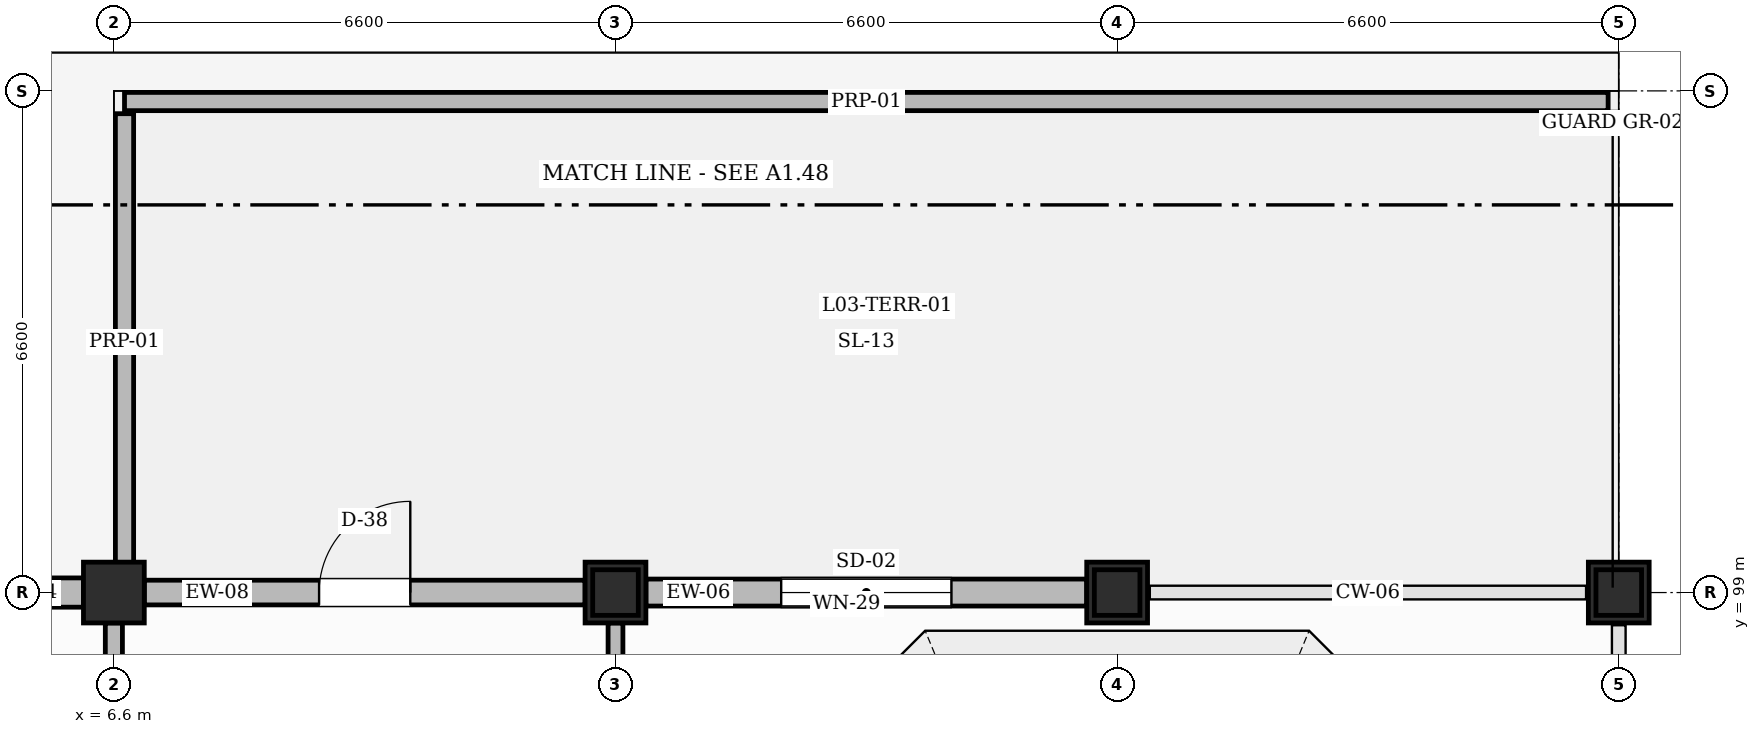
"""IFC4 building model, lengths in metres.
Left out: names, types, materials, properties, quantities, classifications, styles, units other than length and angle.
Written with IfcOpenShell. Run it as: python <this file> out.ifc"""

import sys

from ifc_helpers import new_model, si_unit, direction, frame, frame_2d, origin, origin_2d, place, context, subcontext, project, spatial, rectangle, extrude, element, fill, save


model = new_model("IFC4")
c1 = context("Model", 3, precision=1e-05, world=origin(), true_north=direction((0.0, 1.0)))
c2 = subcontext(c1, "Body", "Model", "MODEL_VIEW")
j1 = project(units=[si_unit("LENGTHUNIT", "METRE"), si_unit("PLANEANGLEUNIT", "RADIAN")], contexts=[c1])
p1 = place(None, origin())
s1 = spatial("IfcSite", under=j1, at=p1, CompositionType="ELEMENT")
p2 = place(p1, origin())
s2 = spatial("IfcBuilding", under=s1, at=p2, CompositionType="ELEMENT")
p3 = place(p2, frame((0.0, 0.0, 14.4)))
s3 = spatial("IfcBuildingStorey", under=s2, at=p3, CompositionType="ELEMENT", Elevation=14.4)
for number, where, z_axis, x_axis in (
    (1, (6.6, 99.0, 0.0), (0.0, 0.0, 1.0), (1.0, 0.0, 0.0)),
    (2, (13.2, 99.0, 0.0), (0.0, 0.0, 1.0), (1.0, 0.0, 0.0)),
    (3, (19.8, 99.0, 0.0), (0.0, 0.0, 1.0), (1.0, 0.0, 0.0)),
    (4, (26.4, 99.0, 0.0), (0.0, 0.0, 1.0), (1.0, 0.0, 0.0)),
):
    element("IfcColumn", number, at=place(p3, frame(where, z_axis=z_axis, x_axis=x_axis)), inside=s3, PredefinedType="COLUMN", context=c2, shape_type="SweptSolid", body=[
        extrude(rectangle(XDim=0.8, YDim=0.8, at=origin_2d()), origin(), (0.0, 0.0, 1.0), 4.2),
    ])
for number, where, z_axis, x_axis in (
    (5, (26.4, 99.0, 4.2), (0.0, 0.0, 1.0), (1.0, 0.0, 0.0)),
    (6, (19.8, 99.0, 4.2), (0.0, 0.0, 1.0), (1.0, 0.0, 0.0)),
    (7, (13.2, 99.0, 4.2), (0.0, 0.0, 1.0), (1.0, 0.0, 0.0)),
):
    element("IfcColumn", number, at=place(p3, frame(where, z_axis=z_axis, x_axis=x_axis)), inside=s3, PredefinedType="COLUMN", context=c2, shape_type="SweptSolid", body=[
        extrude(rectangle(XDim=0.6, YDim=0.6, at=origin_2d()), origin(), (0.0, 0.0, 1.0), 0.65),
    ])
p4 = place(p3, frame((0.4, 99.0, 0.0), z_axis=(0.0, 0.0, 1.0), x_axis=(1.0, 0.0, 0.0)))
e8 = element("IfcWall", 8, at=p4, inside=s3, PredefinedType="SOLIDWALL", context=c2, shape_type="SweptSolid", body=[
    extrude(rectangle(XDim=5.8, YDim=0.385, at=frame_2d((2.9, 0.0))), origin(), (0.0, 0.0, 1.0), 3.26),
])
p5 = place(p4, frame((1.92, 0.0, 0.95)))
e9 = element("IfcOpeningElement", 9, at=p5, cuts=e8, PredefinedType="OPENING", context=c2, shape_type="SweptSolid", body=[
    extrude(rectangle(XDim=1.96, YDim=1.96, at=frame_2d((0.98, 0.98))), frame((0.0, 0.202, 0.0), z_axis=(0.0, -1.0, 0.0), x_axis=(1.0, 0.0, 0.0)), (0.0, 0.0, 1.0), 0.405),
])
p6 = place(p3, frame((7.0, 99.0, 0.0), z_axis=(0.0, 0.0, 1.0), x_axis=(1.0, 0.0, 0.0)))
e10 = element("IfcWall", 10, at=p6, inside=s3, PredefinedType="SOLIDWALL", context=c2, shape_type="SweptSolid", body=[
    extrude(rectangle(XDim=5.8, YDim=0.325, at=frame_2d((2.9, 0.0))), origin(), (0.0, 0.0, 1.0), 3.26),
])
p7 = place(p6, frame((2.3, 0.0, 0.0)))
e11 = element("IfcOpeningElement", 11, at=p7, cuts=e10, PredefinedType="OPENING", context=c2, shape_type="SweptSolid", body=[
    extrude(rectangle(XDim=1.2, YDim=2.15, at=frame_2d((0.6, 1.075))), frame((0.0, 0.172, 0.0), z_axis=(0.0, -1.0, 0.0), x_axis=(1.0, 0.0, 0.0)), (0.0, 0.0, 1.0), 0.345),
])
p8 = place(p3, frame((13.6, 99.0, 0.0), z_axis=(0.0, 0.0, 1.0), x_axis=(1.0, 0.0, 0.0)))
e12 = element("IfcWall", 12, at=p8, inside=s3, PredefinedType="SOLIDWALL", context=c2, shape_type="SweptSolid", body=[
    extrude(rectangle(XDim=5.8, YDim=0.355, at=frame_2d((2.9, 0.0))), origin(), (0.0, 0.0, 1.0), 3.26),
])
p9 = place(p8, frame((1.78, 0.0, 0.95)))
e13 = element("IfcOpeningElement", 13, at=p9, cuts=e12, PredefinedType="OPENING", context=c2, shape_type="SweptSolid", body=[
    extrude(rectangle(XDim=2.24, YDim=1.3, at=frame_2d((1.12, 0.65))), frame((0.0, 0.188, 0.0), z_axis=(0.0, -1.0, 0.0), x_axis=(1.0, 0.0, 0.0)), (0.0, 0.0, 1.0), 0.375),
])
p10 = place(p3, frame((6.74, 105.46, 0.0), z_axis=(0.0, 0.0, 1.0), x_axis=(1.0, 0.0, 0.0)))
e14 = element("IfcWall", 14, at=p10, inside=s3, PredefinedType="PARAPET", context=c2, shape_type="SweptSolid", body=[
    extrude(rectangle(XDim=6.32, YDim=0.24, at=frame_2d((3.16, 0.0))), origin(), (0.0, 0.0, 1.0), 1.15),
])
p11 = place(p3, frame((6.74, 99.3, 0.0), z_axis=(0.0, 0.0, 1.0), x_axis=(0.0, 1.0, 0.0)))
e15 = element("IfcWall", 15, at=p11, inside=s3, PredefinedType="PARAPET", context=c2, shape_type="SweptSolid", body=[
    extrude(rectangle(XDim=6.0, YDim=0.24, at=frame_2d((3.0, 0.0))), origin(), (0.0, 0.0, 1.0), 1.15),
])
p12 = place(p3, frame((13.34, 105.46, 0.0), z_axis=(0.0, 0.0, 1.0), x_axis=(1.0, 0.0, 0.0)))
e16 = element("IfcWall", 16, at=p12, inside=s3, PredefinedType="PARAPET", context=c2, shape_type="SweptSolid", body=[
    extrude(rectangle(XDim=6.32, YDim=0.24, at=frame_2d((3.16, 0.0))), origin(), (0.0, 0.0, 1.0), 1.15),
])
p13 = place(p3, frame((19.94, 105.46, 0.0), z_axis=(0.0, 0.0, 1.0), x_axis=(1.0, 0.0, 0.0)))
e17 = element("IfcWall", 17, at=p13, inside=s3, PredefinedType="PARAPET", context=c2, shape_type="SweptSolid", body=[
    extrude(rectangle(XDim=6.32, YDim=0.24, at=frame_2d((3.16, 0.0))), origin(), (0.0, 0.0, 1.0), 1.15),
])
p14 = place(p3, frame((26.26, 105.16, 0.0), z_axis=(0.0, 0.0, 1.0), x_axis=(0.0, 1.0, 0.0)))
e18 = element("IfcWall", 18, at=p14, inside=s3, PredefinedType="PARAPET", context=c2, shape_type="SweptSolid", body=[
    extrude(rectangle(XDim=0.16, YDim=0.24, at=frame_2d((0.08, 0.0))), origin(), (0.0, 0.0, 1.0), 1.15),
])
p15 = place(p3, frame((6.6, 92.8, 0.0), z_axis=(0.0, 0.0, 1.0), x_axis=(0.0, 1.0, 0.0)))
e19 = element("IfcWall", 19, at=p15, inside=s3, PredefinedType="PARTITIONING", context=c2, shape_type="SweptSolid", body=[
    extrude(rectangle(XDim=5.8, YDim=0.225, at=frame_2d((2.9, 0.0))), origin(), (0.0, 0.0, 1.0), 3.16),
])
p16 = place(p15, frame((2.16, 0.0, 0.0)))
e20 = element("IfcOpeningElement", 20, at=p16, cuts=e19, PredefinedType="OPENING", context=c2, shape_type="SweptSolid", body=[
    extrude(rectangle(XDim=1.48, YDim=2.25, at=frame_2d((0.74, 1.125))), frame((0.0, 0.123, 0.0), z_axis=(0.0, -1.0, 0.0), x_axis=(1.0, 0.0, 0.0)), (0.0, 0.0, 1.0), 0.245),
])
p17 = place(p3, frame((13.2, 92.8, 0.0), z_axis=(0.0, 0.0, 1.0), x_axis=(0.0, 1.0, 0.0)))
e21 = element("IfcWall", 21, at=p17, inside=s3, PredefinedType="PARTITIONING", context=c2, shape_type="SweptSolid", body=[
    extrude(rectangle(XDim=5.8, YDim=0.195, at=frame_2d((2.9, 0.0))), origin(), (0.0, 0.0, 1.0), 3.16),
])
p18 = place(p17, frame((2.25, 0.0, 0.0)))
e22 = element("IfcOpeningElement", 22, at=p18, cuts=e21, PredefinedType="OPENING", context=c2, shape_type="SweptSolid", body=[
    extrude(rectangle(XDim=1.3, YDim=2.3, at=frame_2d((0.65, 1.15))), frame((0.0, 0.107, 0.0), z_axis=(0.0, -1.0, 0.0), x_axis=(1.0, 0.0, 0.0)), (0.0, 0.0, 1.0), 0.215),
])
p19 = place(p7, origin())
e23 = element("IfcDoor", 23, at=p19, inside=s3, OperationType="SINGLE_SWING_RIGHT", PredefinedType="DOOR", context=c2, shape_type="SweptSolid", body=[
    extrude(rectangle(XDim=1.2, YDim=2.15, at=frame_2d((0.6, 1.075))), frame((0.0, 0.025, 0.0), z_axis=(0.0, -1.0, 0.0), x_axis=(1.0, 0.0, 0.0)), (0.0, 0.0, 1.0), 0.05),
])
fill(e11, e23)
p20 = place(p9, origin())
e24 = element("IfcWindow", 24, at=p20, inside=s3, PartitioningType="DOUBLE_PANEL_VERTICAL", PredefinedType="WINDOW", context=c2, shape_type="SweptSolid", body=[
    extrude(rectangle(XDim=2.24, YDim=1.3, at=frame_2d((1.12, 0.65))), frame((0.0, 0.03, 0.0), z_axis=(0.0, -1.0, 0.0), x_axis=(1.0, 0.0, 0.0)), (0.0, 0.0, 1.0), 0.06),
])
fill(e13, e24)
save(model, sys.argv[1])
